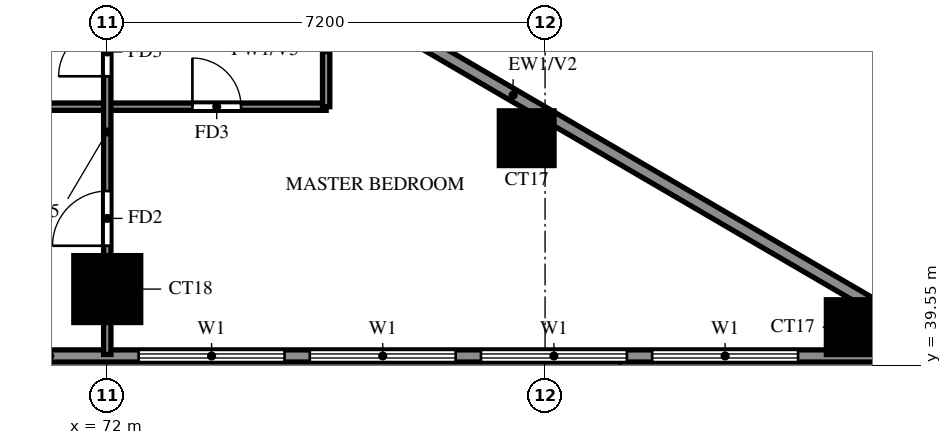
"""IFC4 building model, lengths in metres.
Left out: names, types, materials, properties, quantities, classifications, styles, units other than length and angle.
Written with IfcOpenShell. Run it as: python <this file> out.ifc"""

import sys

from ifc_helpers import new_model, si_unit, direction, frame, frame_2d, origin, origin_2d, place, context, subcontext, project, spatial, rectangle, extrude, source, transform, mapped, element, fill, save


model = new_model("IFC4")
c1 = context("Model", 3, precision=1e-05, world=origin(), true_north=direction((0.0, 1.0)))
c2 = subcontext(c1, "Body", "Model", "MODEL_VIEW")
j1 = project(units=[si_unit("LENGTHUNIT", "METRE"), si_unit("PLANEANGLEUNIT", "RADIAN")], contexts=[c1])
p1 = place(None, origin())
s1 = spatial("IfcSite", under=j1, at=p1, CompositionType="ELEMENT")
p2 = place(p1, origin())
s2 = spatial("IfcBuilding", under=s1, at=p2, CompositionType="ELEMENT")
p3 = place(p2, frame((0.0, 0.0, 113.0)))
s3 = spatial("IfcBuildingStorey", under=s2, at=p3, CompositionType="ELEMENT", Elevation=113.0)
m1 = source(origin(), c2, "Body", "SweptSolid", [
    extrude(rectangle(XDim=0.9, YDim=0.9, at=origin_2d()), origin(), (0.0, 0.0, 1.0), 3.5),
])
p4 = place(p3, frame((84.276, 40.174, -0.3), z_axis=(0.0, 0.0, 1.0), x_axis=(1.0, 0.0, 0.0)))
e1 = element("IfcColumn", 1, at=p4, inside=s3, PredefinedType="COLUMN", context=c2, shape_type="MappedRepresentation", body=[
    mapped(m1, transform((0.0, 0.0, 0.0))),
])
m2 = source(origin(), c2, "Body", "SweptSolid", [
    extrude(rectangle(XDim=1.1, YDim=1.1, at=origin_2d()), origin(), (0.0, 0.0, 1.0), 3.2),
])
p5 = place(p3, frame((72.0, 40.8, 0.0), z_axis=(0.0, 0.0, 1.0), x_axis=(1.0, 0.0, 0.0)))
e2 = element("IfcColumn", 2, at=p5, inside=s3, PredefinedType="COLUMN", context=c2, shape_type="MappedRepresentation", body=[
    mapped(m2, transform((0.0, 0.0, 0.0))),
])
p6 = place(p3, frame((78.898, 43.282, -0.3), z_axis=(0.0, 0.0, 1.0), x_axis=(1.0, 0.0, 0.0)))
e3 = element("IfcColumn", 3, at=p6, inside=s3, PredefinedType="COLUMN", context=c2, shape_type="MappedRepresentation", body=[
    mapped(m1, transform((0.0, 0.0, 0.0))),
])
p7 = place(p3, frame((85.719, 39.881, 0.0), z_axis=(0.0, 0.0, 1.0), x_axis=(-0.86377618652, 0.503875678716, 0.0)))
e4 = element("IfcWall", 4, at=p7, inside=s3, PredefinedType="SOLIDWALL", context=c2, shape_type="SweptSolid", body=[
    extrude(rectangle(XDim=16.311, YDim=0.2, at=frame_2d((8.156, 0.0))), origin(), (0.0, 0.0, 1.0), 3.2),
])
p8 = place(p7, frame((13.326, 0.0, 1.5)))
e5 = element("IfcOpeningElement", 5, at=p8, cuts=e4, PredefinedType="OPENING", context=c2, shape_type="SweptSolid", body=[
    extrude(rectangle(XDim=0.9, YDim=0.9, at=frame_2d((0.45, 0.45))), frame((0.0, 0.11, 0.0), z_axis=(0.0, -1.0, 0.0), x_axis=(1.0, 0.0, 0.0)), (0.0, 0.0, 1.0), 0.22),
])
p9 = place(p3, frame((58.8, 39.7, 0.0), z_axis=(0.0, 0.0, 1.0), x_axis=(1.0, 0.0, 0.0)))
e6 = element("IfcWall", 6, at=p9, inside=s3, PredefinedType="SOLIDWALL", context=c2, shape_type="SweptSolid", body=[
    extrude(rectangle(XDim=27.23, YDim=0.2, at=frame_2d((13.615, 0.0))), origin(), (0.0, 0.0, 1.0), 3.2),
])
p10 = place(p9, frame((3.3, 0.0, 0.0)))
e7 = element("IfcOpeningElement", 7, at=p10, cuts=e6, PredefinedType="OPENING", context=c2, shape_type="SweptSolid", body=[
    extrude(rectangle(XDim=1.8, YDim=2.4, at=frame_2d((0.9, 1.2))), frame((0.0, 0.11, 0.0), z_axis=(0.0, -1.0, 0.0), x_axis=(1.0, 0.0, 0.0)), (0.0, 0.0, 1.0), 0.22),
])
p11 = place(p9, frame((1.5, 0.0, 0.6)))
e8 = element("IfcOpeningElement", 8, at=p11, cuts=e6, PredefinedType="OPENING", context=c2, shape_type="SweptSolid", body=[
    extrude(rectangle(XDim=1.2, YDim=2.4, at=frame_2d((0.6, 1.2))), frame((0.0, 0.11, 0.0), z_axis=(0.0, -1.0, 0.0), x_axis=(1.0, 0.0, 0.0)), (0.0, 0.0, 1.0), 0.22),
])
p12 = place(p9, frame((6.3, 0.0, 0.6)))
e9 = element("IfcOpeningElement", 9, at=p12, cuts=e6, PredefinedType="OPENING", context=c2, shape_type="SweptSolid", body=[
    extrude(rectangle(XDim=2.4, YDim=2.4, at=frame_2d((1.2, 1.2))), frame((0.0, 0.11, 0.0), z_axis=(0.0, -1.0, 0.0), x_axis=(1.0, 0.0, 0.0)), (0.0, 0.0, 1.0), 0.22),
])
p13 = place(p9, frame((13.715, 0.0, 0.6)))
e10 = element("IfcOpeningElement", 10, at=p13, cuts=e6, PredefinedType="OPENING", context=c2, shape_type="SweptSolid", body=[
    extrude(rectangle(XDim=2.4, YDim=2.4, at=frame_2d((1.2, 1.2))), frame((0.0, 0.11, 0.0), z_axis=(0.0, -1.0, 0.0), x_axis=(1.0, 0.0, 0.0)), (0.0, 0.0, 1.0), 0.22),
])
p14 = place(p9, frame((16.531, 0.0, 0.6)))
e11 = element("IfcOpeningElement", 11, at=p14, cuts=e6, PredefinedType="OPENING", context=c2, shape_type="SweptSolid", body=[
    extrude(rectangle(XDim=2.4, YDim=2.4, at=frame_2d((1.2, 1.2))), frame((0.0, 0.11, 0.0), z_axis=(0.0, -1.0, 0.0), x_axis=(1.0, 0.0, 0.0)), (0.0, 0.0, 1.0), 0.22),
])
p15 = place(p9, frame((19.346, 0.0, 0.6)))
e12 = element("IfcOpeningElement", 12, at=p15, cuts=e6, PredefinedType="OPENING", context=c2, shape_type="SweptSolid", body=[
    extrude(rectangle(XDim=2.4, YDim=2.4, at=frame_2d((1.2, 1.2))), frame((0.0, 0.11, 0.0), z_axis=(0.0, -1.0, 0.0), x_axis=(1.0, 0.0, 0.0)), (0.0, 0.0, 1.0), 0.22),
])
p16 = place(p9, frame((22.161, 0.0, 0.6)))
e13 = element("IfcOpeningElement", 13, at=p16, cuts=e6, PredefinedType="OPENING", context=c2, shape_type="SweptSolid", body=[
    extrude(rectangle(XDim=2.4, YDim=2.4, at=frame_2d((1.2, 1.2))), frame((0.0, 0.11, 0.0), z_axis=(0.0, -1.0, 0.0), x_axis=(1.0, 0.0, 0.0)), (0.0, 0.0, 1.0), 0.22),
])
p17 = place(p9, frame((26.003, 0.0, 0.6)))
e14 = element("IfcOpeningElement", 14, at=p17, cuts=e6, PredefinedType="OPENING", context=c2, shape_type="SweptSolid", body=[
    extrude(rectangle(XDim=0.9, YDim=2.4, at=frame_2d((0.45, 1.2))), frame((0.0, 0.11, 0.0), z_axis=(0.0, -1.0, 0.0), x_axis=(1.0, 0.0, 0.0)), (0.0, 0.0, 1.0), 0.22),
])
p18 = place(p3, frame((60.0, 43.8, 0.0), z_axis=(0.0, 0.0, 1.0), x_axis=(1.0, 0.0, 0.0)))
e15 = element("IfcWall", 15, at=p18, inside=s3, PredefinedType="PARTITIONING", context=c2, shape_type="SweptSolid", body=[
    extrude(rectangle(XDim=15.6, YDim=0.12, at=frame_2d((7.8, 0.0))), origin(), (0.0, 0.0, 1.0), 3.2),
])
p19 = place(p18, frame((9.75, 0.0, 0.0)))
e16 = element("IfcOpeningElement", 16, at=p19, cuts=e15, PredefinedType="OPENING", context=c2, shape_type="SweptSolid", body=[
    extrude(rectangle(XDim=0.9, YDim=2.1, at=frame_2d((0.45, 1.05))), frame((0.0, 0.07, 0.0), z_axis=(0.0, -1.0, 0.0), x_axis=(1.0, 0.0, 0.0)), (0.0, 0.0, 1.0), 0.14),
])
p20 = place(p18, frame((3.45, 0.0, 0.0)))
e17 = element("IfcOpeningElement", 17, at=p20, cuts=e15, PredefinedType="OPENING", context=c2, shape_type="SweptSolid", body=[
    extrude(rectangle(XDim=1.5, YDim=2.1, at=frame_2d((0.75, 1.05))), frame((0.0, 0.07, 0.0), z_axis=(0.0, -1.0, 0.0), x_axis=(1.0, 0.0, 0.0)), (0.0, 0.0, 1.0), 0.14),
])
p21 = place(p18, frame((13.4, 0.0, 0.0)))
e18 = element("IfcOpeningElement", 18, at=p21, cuts=e15, PredefinedType="OPENING", context=c2, shape_type="SweptSolid", body=[
    extrude(rectangle(XDim=0.8, YDim=2.1, at=frame_2d((0.4, 1.05))), frame((0.0, 0.07, 0.0), z_axis=(0.0, -1.0, 0.0), x_axis=(1.0, 0.0, 0.0)), (0.0, 0.0, 1.0), 0.14),
])
p22 = place(p3, frame((72.0, 39.725, 0.0), z_axis=(0.0, 0.0, 1.0), x_axis=(0.0, 1.0, 0.0)))
e19 = element("IfcWall", 19, at=p22, inside=s3, PredefinedType="PARTITIONING", context=c2, shape_type="SweptSolid", body=[
    extrude(rectangle(XDim=8.13, YDim=0.12, at=frame_2d((4.065, 0.0))), origin(), (0.0, 0.0, 1.0), 2.3),
])
p23 = place(p22, frame((1.788, 0.0, 0.0)))
e20 = element("IfcOpeningElement", 20, at=p23, cuts=e19, PredefinedType="OPENING", context=c2, shape_type="SweptSolid", body=[
    extrude(rectangle(XDim=0.9, YDim=2.1, at=frame_2d((0.45, 1.05))), frame((0.0, 0.07, 0.0), z_axis=(0.0, -1.0, 0.0), x_axis=(1.0, 0.0, 0.0)), (0.0, 0.0, 1.0), 0.14),
])
p24 = place(p22, frame((4.575, 0.0, 0.0)))
e21 = element("IfcOpeningElement", 21, at=p24, cuts=e19, PredefinedType="OPENING", context=c2, shape_type="SweptSolid", body=[
    extrude(rectangle(XDim=0.8, YDim=2.1, at=frame_2d((0.4, 1.05))), frame((0.0, 0.07, 0.0), z_axis=(0.0, -1.0, 0.0), x_axis=(1.0, 0.0, 0.0)), (0.0, 0.0, 1.0), 0.14),
])
p25 = place(p3, frame((75.6, 43.8, 0.0), z_axis=(0.0, 0.0, 1.0), x_axis=(0.0, 1.0, 0.0)))
e22 = element("IfcWall", 22, at=p25, inside=s3, PredefinedType="PARTITIONING", context=c2, shape_type="SweptSolid", body=[
    extrude(rectangle(XDim=1.868, YDim=0.12, at=frame_2d((0.934, 0.0))), origin(), (0.0, 0.0, 1.0), 2.3),
])
p26 = place(p13, origin())
e23 = element("IfcWindow", 23, at=p26, inside=s3, PartitioningType="DOUBLE_PANEL_VERTICAL", PredefinedType="WINDOW", context=c2, shape_type="SweptSolid", body=[
    extrude(rectangle(XDim=2.4, YDim=2.4, at=frame_2d((1.2, 1.2))), frame((0.0, 0.03, 0.0), z_axis=(0.0, -1.0, 0.0), x_axis=(1.0, 0.0, 0.0)), (0.0, 0.0, 1.0), 0.06),
])
fill(e10, e23)
p27 = place(p14, origin())
e24 = element("IfcWindow", 24, at=p27, inside=s3, PartitioningType="DOUBLE_PANEL_VERTICAL", PredefinedType="WINDOW", context=c2, shape_type="SweptSolid", body=[
    extrude(rectangle(XDim=2.4, YDim=2.4, at=frame_2d((1.2, 1.2))), frame((0.0, 0.03, 0.0), z_axis=(0.0, -1.0, 0.0), x_axis=(1.0, 0.0, 0.0)), (0.0, 0.0, 1.0), 0.06),
])
fill(e11, e24)
p28 = place(p15, origin())
e25 = element("IfcWindow", 25, at=p28, inside=s3, PartitioningType="DOUBLE_PANEL_VERTICAL", PredefinedType="WINDOW", context=c2, shape_type="SweptSolid", body=[
    extrude(rectangle(XDim=2.4, YDim=2.4, at=frame_2d((1.2, 1.2))), frame((0.0, 0.03, 0.0), z_axis=(0.0, -1.0, 0.0), x_axis=(1.0, 0.0, 0.0)), (0.0, 0.0, 1.0), 0.06),
])
fill(e12, e25)
p29 = place(p16, origin())
e26 = element("IfcWindow", 26, at=p29, inside=s3, PartitioningType="DOUBLE_PANEL_VERTICAL", PredefinedType="WINDOW", context=c2, shape_type="SweptSolid", body=[
    extrude(rectangle(XDim=2.4, YDim=2.4, at=frame_2d((1.2, 1.2))), frame((0.0, 0.03, 0.0), z_axis=(0.0, -1.0, 0.0), x_axis=(1.0, 0.0, 0.0)), (0.0, 0.0, 1.0), 0.06),
])
fill(e13, e26)
p30 = place(p23, origin())
e27 = element("IfcDoor", 27, at=p30, inside=s3, OperationType="SINGLE_SWING_RIGHT", PredefinedType="DOOR", context=c2, shape_type="SweptSolid", body=[
    extrude(rectangle(XDim=0.9, YDim=2.1, at=frame_2d((0.45, 1.05))), frame((0.0, 0.025, 0.0), z_axis=(0.0, -1.0, 0.0), x_axis=(1.0, 0.0, 0.0)), (0.0, 0.0, 1.0), 0.05),
])
fill(e20, e27)
p31 = place(p24, origin())
e28 = element("IfcDoor", 28, at=p31, inside=s3, OperationType="SINGLE_SWING_RIGHT", PredefinedType="DOOR", context=c2, shape_type="SweptSolid", body=[
    extrude(rectangle(XDim=0.8, YDim=2.1, at=frame_2d((0.4, 1.05))), frame((0.0, 0.025, 0.0), z_axis=(0.0, -1.0, 0.0), x_axis=(1.0, 0.0, 0.0)), (0.0, 0.0, 1.0), 0.05),
])
fill(e21, e28)
p32 = place(p21, origin())
e29 = element("IfcDoor", 29, at=p32, inside=s3, OperationType="SINGLE_SWING_LEFT", PredefinedType="DOOR", context=c2, shape_type="SweptSolid", body=[
    extrude(rectangle(XDim=0.8, YDim=2.1, at=frame_2d((0.4, 1.05))), frame((0.0, 0.025, 0.0), z_axis=(0.0, -1.0, 0.0), x_axis=(1.0, 0.0, 0.0)), (0.0, 0.0, 1.0), 0.05),
])
fill(e18, e29)
save(model, sys.argv[1])
